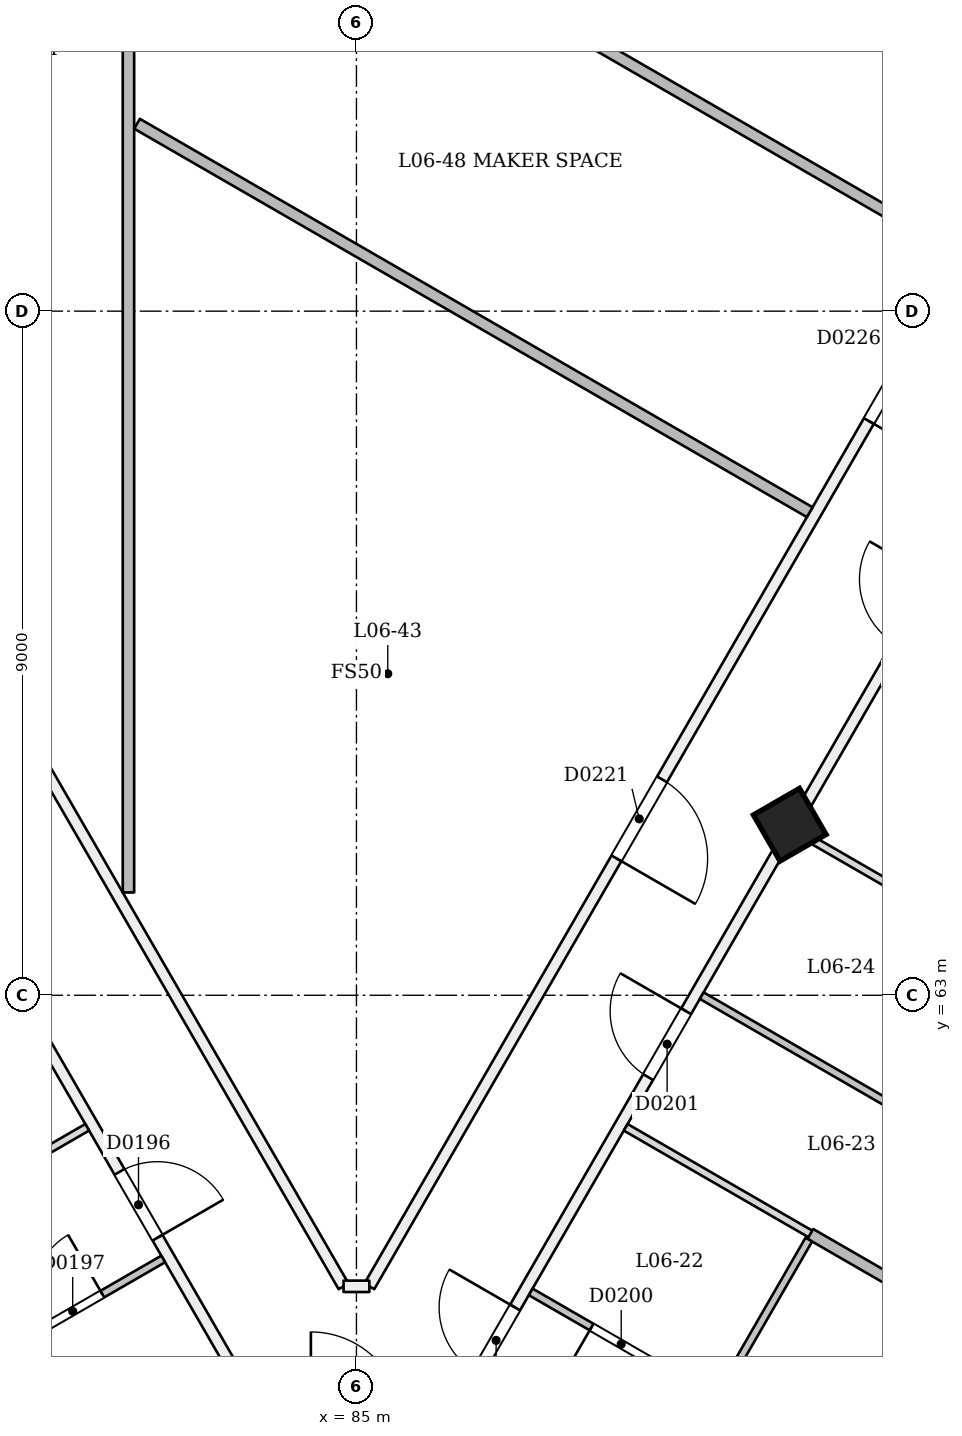
"""IFC4 building model, lengths in metres.
Left out: names, types, materials, properties, quantities, classifications, styles, units other than length and angle.
Written with IfcOpenShell. Run it as: python <this file> out.ifc"""

import sys

from ifc_helpers import new_model, si_unit, direction, frame, frame_2d, origin, origin_2d, place, context, subcontext, project, spatial, rectangle, extrude, element, fill, save


model = new_model("IFC4")
c1 = context("Model", 3, precision=1e-05, world=origin(), true_north=direction((0.0, 1.0)))
c2 = subcontext(c1, "Body", "Model", "MODEL_VIEW")
j1 = project(units=[si_unit("LENGTHUNIT", "METRE"), si_unit("PLANEANGLEUNIT", "RADIAN")], contexts=[c1])
p1 = place(None, origin())
s1 = spatial("IfcSite", under=j1, at=p1, CompositionType="ELEMENT")
p2 = place(p1, origin())
s2 = spatial("IfcBuilding", under=s1, at=p2, CompositionType="ELEMENT")
p3 = place(p2, frame((0.0, 0.0, 30.6)))
s3 = spatial("IfcBuildingStorey", under=s2, at=p3, CompositionType="ELEMENT", Elevation=30.6)
p4 = place(p3, frame((90.728, 65.196, -0.021), z_axis=(-0.022155133694, 0.038483534979, 0.999013597298), x_axis=(-0.501317567522, -0.864978463486, 0.022202571901)))
e1 = element("IfcColumn", 1, at=p4, inside=s3, PredefinedType="COLUMN", context=c2, shape_type="SweptSolid", body=[
    extrude(rectangle(XDim=0.7, YDim=0.7, at=origin_2d()), origin(), (0.0, 0.0, 1.0), 3.604),
])
p5 = place(p3, frame((61.273, 96.374, 0.0), z_axis=(0.0, 0.0, 1.0), x_axis=(0.5000018851, -0.866024315419, 0.0)))
e2 = element("IfcWall", 2, at=p5, inside=s3, PredefinedType="PARTITIONING", context=c2, shape_type="SweptSolid", body=[
    extrude(rectangle(XDim=45.0, YDim=0.15, at=frame_2d((22.5, 0.0))), origin(), (0.0, 0.0, 1.0), 2.7),
])
p6 = place(p5, frame((2.829, 0.0, 0.0)))
e3 = element("IfcOpeningElement", 3, at=p6, cuts=e2, PredefinedType="OPENING", context=c2, shape_type="SweptSolid", body=[
    extrude(rectangle(XDim=1.1, YDim=2.1, at=frame_2d((0.55, 1.05))), frame((0.0, 0.085, 0.0), z_axis=(0.0, -1.0, 0.0), x_axis=(1.0, 0.0, 0.0)), (0.0, 0.0, 1.0), 0.171),
])
p7 = place(p5, frame((7.3, 0.0, 0.0)))
e4 = element("IfcOpeningElement", 4, at=p7, cuts=e2, PredefinedType="OPENING", context=c2, shape_type="SweptSolid", body=[
    extrude(rectangle(XDim=1.2, YDim=2.1, at=frame_2d((0.6, 1.05))), frame((0.0, 0.085, 0.0), z_axis=(0.0, -1.0, 0.0), x_axis=(1.0, 0.0, 0.0)), (0.0, 0.0, 1.0), 0.171),
])
p8 = place(p5, frame((14.22, 0.0, 0.0)))
e5 = element("IfcOpeningElement", 5, at=p8, cuts=e2, PredefinedType="OPENING", context=c2, shape_type="SweptSolid", body=[
    extrude(rectangle(XDim=1.0, YDim=2.1, at=frame_2d((0.5, 1.05))), frame((0.0, 0.085, 0.0), z_axis=(0.0, -1.0, 0.0), x_axis=(1.0, 0.0, 0.0)), (0.0, 0.0, 1.0), 0.171),
])
p9 = place(p5, frame((20.895, 0.0, 0.0)))
e6 = element("IfcOpeningElement", 6, at=p9, cuts=e2, PredefinedType="OPENING", context=c2, shape_type="SweptSolid", body=[
    extrude(rectangle(XDim=1.0, YDim=2.1, at=frame_2d((0.5, 1.05))), frame((0.0, 0.085, 0.0), z_axis=(0.0, -1.0, 0.0), x_axis=(1.0, 0.0, 0.0)), (0.0, 0.0, 1.0), 0.171),
])
p10 = place(p5, frame((24.25, 0.0, 0.0)))
e7 = element("IfcOpeningElement", 7, at=p10, cuts=e2, PredefinedType="OPENING", context=c2, shape_type="SweptSolid", body=[
    extrude(rectangle(XDim=1.0, YDim=2.1, at=frame_2d((0.5, 1.05))), frame((0.0, 0.085, 0.0), z_axis=(0.0, -1.0, 0.0), x_axis=(1.0, 0.0, 0.0)), (0.0, 0.0, 1.0), 0.171),
])
p11 = place(p5, frame((29.78, 0.0, 0.0)))
e8 = element("IfcOpeningElement", 8, at=p11, cuts=e2, PredefinedType="OPENING", context=c2, shape_type="SweptSolid", body=[
    extrude(rectangle(XDim=1.0, YDim=2.1, at=frame_2d((0.5, 1.05))), frame((0.0, 0.085, 0.0), z_axis=(0.0, -1.0, 0.0), x_axis=(1.0, 0.0, 0.0)), (0.0, 0.0, 1.0), 0.171),
])
p12 = place(p5, frame((34.3, 0.0, 0.0)))
e9 = element("IfcOpeningElement", 9, at=p12, cuts=e2, PredefinedType="OPENING", context=c2, shape_type="SweptSolid", body=[
    extrude(rectangle(XDim=1.2, YDim=2.1, at=frame_2d((0.6, 1.05))), frame((0.0, 0.085, 0.0), z_axis=(0.0, -1.0, 0.0), x_axis=(1.0, 0.0, 0.0)), (0.0, 0.0, 1.0), 0.171),
])
p13 = place(p5, frame((41.22, 0.0, 0.0)))
e10 = element("IfcOpeningElement", 10, at=p13, cuts=e2, PredefinedType="OPENING", context=c2, shape_type="SweptSolid", body=[
    extrude(rectangle(XDim=1.0, YDim=2.1, at=frame_2d((0.5, 1.05))), frame((0.0, 0.085, 0.0), z_axis=(0.0, -1.0, 0.0), x_axis=(1.0, 0.0, 0.0)), (0.0, 0.0, 1.0), 0.171),
])
p14 = place(p3, frame((86.227, 57.403, 0.0), z_axis=(0.0, 0.0, 1.0), x_axis=(0.5000018851, 0.866024315419, 0.0)))
e11 = element("IfcWall", 11, at=p14, inside=s3, PredefinedType="PARTITIONING", context=c2, shape_type="SweptSolid", body=[
    extrude(rectangle(XDim=45.0, YDim=0.15, at=frame_2d((22.5, 0.0))), origin(), (0.0, 0.0, 1.0), 2.7),
])
p15 = place(p14, frame((0.72, 0.0, 0.0)))
e12 = element("IfcOpeningElement", 12, at=p15, cuts=e11, PredefinedType="OPENING", context=c2, shape_type="SweptSolid", body=[
    extrude(rectangle(XDim=1.0, YDim=2.1, at=frame_2d((0.5, 1.05))), frame((0.0, 0.085, 0.0), z_axis=(0.0, -1.0, 0.0), x_axis=(1.0, 0.0, 0.0)), (0.0, 0.0, 1.0), 0.171),
])
p16 = place(p14, frame((5.22, 0.0, 0.0)))
e13 = element("IfcOpeningElement", 13, at=p16, cuts=e11, PredefinedType="OPENING", context=c2, shape_type="SweptSolid", body=[
    extrude(rectangle(XDim=1.0, YDim=2.1, at=frame_2d((0.5, 1.05))), frame((0.0, 0.085, 0.0), z_axis=(0.0, -1.0, 0.0), x_axis=(1.0, 0.0, 0.0)), (0.0, 0.0, 1.0), 0.171),
])
p17 = place(p14, frame((11.78, 0.0, 0.0)))
e14 = element("IfcOpeningElement", 14, at=p17, cuts=e11, PredefinedType="OPENING", context=c2, shape_type="SweptSolid", body=[
    extrude(rectangle(XDim=1.0, YDim=2.1, at=frame_2d((0.5, 1.05))), frame((0.0, 0.085, 0.0), z_axis=(0.0, -1.0, 0.0), x_axis=(1.0, 0.0, 0.0)), (0.0, 0.0, 1.0), 0.171),
])
p18 = place(p14, frame((14.22, 0.0, 0.0)))
e15 = element("IfcOpeningElement", 15, at=p18, cuts=e11, PredefinedType="OPENING", context=c2, shape_type="SweptSolid", body=[
    extrude(rectangle(XDim=1.0, YDim=2.1, at=frame_2d((0.5, 1.05))), frame((0.0, 0.085, 0.0), z_axis=(0.0, -1.0, 0.0), x_axis=(1.0, 0.0, 0.0)), (0.0, 0.0, 1.0), 0.171),
])
p19 = place(p14, frame((19.75, 0.0, 0.0)))
e16 = element("IfcOpeningElement", 16, at=p19, cuts=e11, PredefinedType="OPENING", context=c2, shape_type="SweptSolid", body=[
    extrude(rectangle(XDim=1.0, YDim=2.1, at=frame_2d((0.5, 1.05))), frame((0.0, 0.085, 0.0), z_axis=(0.0, -1.0, 0.0), x_axis=(1.0, 0.0, 0.0)), (0.0, 0.0, 1.0), 0.171),
])
p20 = place(p14, frame((23.105, 0.0, 0.0)))
e17 = element("IfcOpeningElement", 17, at=p20, cuts=e11, PredefinedType="OPENING", context=c2, shape_type="SweptSolid", body=[
    extrude(rectangle(XDim=1.0, YDim=2.1, at=frame_2d((0.5, 1.05))), frame((0.0, 0.085, 0.0), z_axis=(0.0, -1.0, 0.0), x_axis=(1.0, 0.0, 0.0)), (0.0, 0.0, 1.0), 0.171),
])
p21 = place(p14, frame((28.75, 0.0, 0.0)))
e18 = element("IfcOpeningElement", 18, at=p21, cuts=e11, PredefinedType="OPENING", context=c2, shape_type="SweptSolid", body=[
    extrude(rectangle(XDim=1.0, YDim=2.1, at=frame_2d((0.5, 1.05))), frame((0.0, 0.085, 0.0), z_axis=(0.0, -1.0, 0.0), x_axis=(1.0, 0.0, 0.0)), (0.0, 0.0, 1.0), 0.171),
])
p22 = place(p14, frame((32.105, 0.0, 0.0)))
e19 = element("IfcOpeningElement", 19, at=p22, cuts=e11, PredefinedType="OPENING", context=c2, shape_type="SweptSolid", body=[
    extrude(rectangle(XDim=1.0, YDim=2.1, at=frame_2d((0.5, 1.05))), frame((0.0, 0.085, 0.0), z_axis=(0.0, -1.0, 0.0), x_axis=(1.0, 0.0, 0.0)), (0.0, 0.0, 1.0), 0.171),
])
p23 = place(p14, frame((36.504, 0.0, 0.0)))
e20 = element("IfcOpeningElement", 20, at=p23, cuts=e11, PredefinedType="OPENING", context=c2, shape_type="SweptSolid", body=[
    extrude(rectangle(XDim=1.0, YDim=2.1, at=frame_2d((0.5, 1.05))), frame((0.0, 0.085, 0.0), z_axis=(0.0, -1.0, 0.0), x_axis=(1.0, 0.0, 0.0)), (0.0, 0.0, 1.0), 0.171),
])
p24 = place(p14, frame((38.654, 0.0, 0.0)))
e21 = element("IfcOpeningElement", 21, at=p24, cuts=e11, PredefinedType="OPENING", context=c2, shape_type="SweptSolid", body=[
    extrude(rectangle(XDim=1.0, YDim=2.1, at=frame_2d((0.5, 1.05))), frame((0.0, 0.085, 0.0), z_axis=(0.0, -1.0, 0.0), x_axis=(1.0, 0.0, 0.0)), (0.0, 0.0, 1.0), 0.171),
])
p25 = place(p14, frame((41.071, 0.0, 0.0)))
e22 = element("IfcOpeningElement", 22, at=p25, cuts=e11, PredefinedType="OPENING", context=c2, shape_type="SweptSolid", body=[
    extrude(rectangle(XDim=1.1, YDim=2.1, at=frame_2d((0.55, 1.05))), frame((0.0, 0.085, 0.0), z_axis=(0.0, -1.0, 0.0), x_axis=(1.0, 0.0, 0.0)), (0.0, 0.0, 1.0), 0.171),
])
p26 = place(p3, frame((103.315, 90.6, 0.0), z_axis=(0.0, 0.0, 1.0), x_axis=(-0.499999056994, -0.866025948229, 0.0)))
e23 = element("IfcWall", 23, at=p26, inside=s3, PredefinedType="PARTITIONING", context=c2, shape_type="SweptSolid", body=[
    extrude(rectangle(XDim=36.292, YDim=0.15, at=frame_2d((18.146, 0.0))), origin(), (0.0, 0.0, 1.0), 3.1),
])
p27 = place(p26, frame((10.576, 0.0, 0.0)))
e24 = element("IfcOpeningElement", 24, at=p27, cuts=e23, PredefinedType="OPENING", context=c2, shape_type="SweptSolid", body=[
    extrude(rectangle(XDim=1.2, YDim=2.1, at=frame_2d((0.6, 1.05))), frame((0.0, 0.085, 0.0), z_axis=(0.0, -1.0, 0.0), x_axis=(1.0, 0.0, 0.0)), (0.0, 0.0, 1.0), 0.171),
])
p28 = place(p26, frame((28.59, 0.0, 0.0)))
e25 = element("IfcOpeningElement", 25, at=p28, cuts=e23, PredefinedType="OPENING", context=c2, shape_type="SweptSolid", body=[
    extrude(rectangle(XDim=1.2, YDim=2.1, at=frame_2d((0.6, 1.05))), frame((0.0, 0.085, 0.0), z_axis=(0.0, -1.0, 0.0), x_axis=(1.0, 0.0, 0.0)), (0.0, 0.0, 1.0), 0.171),
])
p29 = place(p26, frame((17.248, 0.0, 0.0)))
e26 = element("IfcOpeningElement", 26, at=p29, cuts=e23, PredefinedType="OPENING", context=c2, shape_type="SweptSolid", body=[
    extrude(rectangle(XDim=1.2, YDim=2.1, at=frame_2d((0.6, 1.05))), frame((0.0, 0.085, 0.0), z_axis=(0.0, -1.0, 0.0), x_axis=(1.0, 0.0, 0.0)), (0.0, 0.0, 1.0), 0.171),
])
p30 = place(p26, frame((4.5, 0.0, 0.0)))
e27 = element("IfcOpeningElement", 27, at=p30, cuts=e23, PredefinedType="OPENING", context=c2, shape_type="SweptSolid", body=[
    extrude(rectangle(XDim=1.2, YDim=2.1, at=frame_2d((0.6, 1.05))), frame((0.0, 0.085, 0.0), z_axis=(0.0, -1.0, 0.0), x_axis=(1.0, 0.0, 0.0)), (0.0, 0.0, 1.0), 0.171),
])
p31 = place(p26, frame((21.947, 0.0, 0.0)))
e28 = element("IfcOpeningElement", 28, at=p31, cuts=e23, PredefinedType="OPENING", context=c2, shape_type="SweptSolid", body=[
    extrude(rectangle(XDim=1.2, YDim=2.1, at=frame_2d((0.6, 1.05))), frame((0.0, 0.085, 0.0), z_axis=(0.0, -1.0, 0.0), x_axis=(1.0, 0.0, 0.0)), (0.0, 0.0, 1.0), 0.171),
])
p32 = place(p3, frame((84.831, 59.171, 0.0), z_axis=(0.0, 0.0, 1.0), x_axis=(-0.499999056994, 0.866025948229, 0.0)))
e29 = element("IfcWall", 29, at=p32, inside=s3, PredefinedType="PARTITIONING", context=c2, shape_type="SweptSolid", body=[
    extrude(rectangle(XDim=36.292, YDim=0.15, at=frame_2d((18.146, 0.0))), origin(), (0.0, 0.0, 1.0), 3.1),
])
p33 = place(p32, frame((16.276, 0.0, 0.0)))
e30 = element("IfcOpeningElement", 30, at=p33, cuts=e29, PredefinedType="OPENING", context=c2, shape_type="SweptSolid", body=[
    extrude(rectangle(XDim=1.2, YDim=2.1, at=frame_2d((0.6, 1.05))), frame((0.0, 0.085, 0.0), z_axis=(0.0, -1.0, 0.0), x_axis=(1.0, 0.0, 0.0)), (0.0, 0.0, 1.0), 0.171),
])
p34 = place(p32, frame((27.931, 0.0, 0.0)))
e31 = element("IfcOpeningElement", 31, at=p34, cuts=e29, PredefinedType="OPENING", context=c2, shape_type="SweptSolid", body=[
    extrude(rectangle(XDim=1.2, YDim=2.1, at=frame_2d((0.6, 1.05))), frame((0.0, 0.085, 0.0), z_axis=(0.0, -1.0, 0.0), x_axis=(1.0, 0.0, 0.0)), (0.0, 0.0, 1.0), 0.171),
])
p35 = place(p3, frame((85.169, 59.171, 0.0), z_axis=(0.0, 0.0, 1.0), x_axis=(-1.0, 0.0, 0.0)))
e32 = element("IfcWall", 32, at=p35, inside=s3, PredefinedType="PARTITIONING", context=c2, shape_type="SweptSolid", body=[
    extrude(rectangle(XDim=0.339, YDim=0.15, at=frame_2d((0.169, 0.0))), origin(), (0.0, 0.0, 1.0), 3.1),
])
p36 = place(p3, frame((75.963, 58.09, 0.0), z_axis=(0.0, 0.0, 1.0), x_axis=(0.866025401434, 0.500000004071, 0.0)))
e33 = element("IfcWall", 33, at=p36, inside=s3, PredefinedType="PARTITIONING", context=c2, shape_type="SweptSolid", body=[
    extrude(rectangle(XDim=6.345, YDim=0.1, at=frame_2d((3.173, 0.0))), origin(), (0.0, 0.0, 1.0), 2.6),
])
p37 = place(p3, frame((80.011, 58.118, 0.0), z_axis=(0.0, 0.0, 1.0), x_axis=(0.866011447264, 0.500024172624, 0.0)))
e34 = element("IfcWall", 34, at=p37, inside=s3, PredefinedType="PARTITIONING", context=c2, shape_type="SweptSolid", body=[
    extrude(rectangle(XDim=2.825, YDim=0.1, at=frame_2d((1.413, 0.0))), origin(), (0.0, 0.0, 1.0), 3.1),
])
p38 = place(p37, frame((1.0, 0.0, 0.0)))
e35 = element("IfcOpeningElement", 35, at=p38, cuts=e34, PredefinedType="OPENING", context=c2, shape_type="SweptSolid", body=[
    extrude(rectangle(XDim=0.9, YDim=2.1, at=frame_2d((0.45, 1.05))), frame((0.0, 0.061, 0.0), z_axis=(0.0, -1.0, 0.0), x_axis=(1.0, 0.0, 0.0)), (0.0, 0.0, 1.0), 0.121),
])
p39 = place(p3, frame((90.951, 59.785, 0.0), z_axis=(0.0, 0.0, 1.0), x_axis=(-0.500047793048, -0.865997808697, 0.0)))
e36 = element("IfcWall", 36, at=p39, inside=s3, PredefinedType="PARTITIONING", context=c2, shape_type="SweptSolid", body=[
    extrude(rectangle(XDim=2.425, YDim=0.1, at=frame_2d((1.212, 0.0))), origin(), (0.0, 0.0, 1.0), 3.1),
])
p40 = place(p3, frame((89.739, 57.685, 0.0), z_axis=(0.0, 0.0, 1.0), x_axis=(-0.866048868473, 0.499959355765, 0.0)))
e37 = element("IfcWall", 37, at=p40, inside=s3, PredefinedType="PARTITIONING", context=c2, shape_type="SweptSolid", body=[
    extrude(rectangle(XDim=2.825, YDim=0.1, at=frame_2d((1.413, 0.0))), origin(), (0.0, 0.0, 1.0), 3.1),
])
p41 = place(p40, frame((1.0, 0.0, 0.0)))
e38 = element("IfcOpeningElement", 38, at=p41, cuts=e37, PredefinedType="OPENING", context=c2, shape_type="SweptSolid", body=[
    extrude(rectangle(XDim=0.9, YDim=2.1, at=frame_2d((0.45, 1.05))), frame((0.0, 0.061, 0.0), z_axis=(0.0, -1.0, 0.0), x_axis=(1.0, 0.0, 0.0)), (0.0, 0.0, 1.0), 0.121),
])
p42 = place(p3, frame((94.037, 58.09, 0.0), z_axis=(0.0, 0.0, 1.0), x_axis=(-0.866036293601, 0.499981137809, 0.0)))
e39 = element("IfcWall", 39, at=p42, inside=s3, PredefinedType="PARTITIONING", context=c2, shape_type="SweptSolid", body=[
    extrude(rectangle(XDim=3.54, YDim=0.15, at=frame_2d((1.77, 0.0))), origin(), (0.0, 0.0, 1.0), 2.6),
])
p43 = place(p3, frame((91.006, 59.84, 0.0), z_axis=(0.0, 0.0, 1.0), x_axis=(-0.866011243319, 0.500024525844, 0.0)))
e40 = element("IfcWall", 40, at=p43, inside=s3, PredefinedType="PARTITIONING", context=c2, shape_type="SweptSolid", body=[
    extrude(rectangle(XDim=2.845, YDim=0.1, at=frame_2d((1.422, 0.0))), origin(), (0.0, 0.0, 1.0), 3.1),
])
p44 = place(p3, frame((91.989, 61.582, 0.0), z_axis=(0.0, 0.0, 1.0), x_axis=(-0.866011447264, 0.500024172624, 0.0)))
e41 = element("IfcWall", 41, at=p44, inside=s3, PredefinedType="PARTITIONING", context=c2, shape_type="SweptSolid", body=[
    extrude(rectangle(XDim=2.825, YDim=0.1, at=frame_2d((1.413, 0.0))), origin(), (0.0, 0.0, 1.0), 3.1),
])
p45 = place(p3, frame((93.196, 63.772, 0.0), z_axis=(0.0, 0.0, 1.0), x_axis=(-0.866042014628, 0.499971228071, 0.0)))
e42 = element("IfcWall", 42, at=p45, inside=s3, PredefinedType="PARTITIONING", context=c2, shape_type="SweptSolid", body=[
    extrude(rectangle(XDim=2.775, YDim=0.1, at=frame_2d((1.388, 0.0))), origin(), (0.0, 0.0, 1.0), 2.7),
])
p46 = place(p3, frame((82.0, 64.352, 0.0), z_axis=(0.0, 0.0, 1.0), x_axis=(0.0, 1.0, 0.0)))
e43 = element("IfcWall", 43, at=p46, inside=s3, PredefinedType="PARTITIONING", context=c2, shape_type="SweptSolid", body=[
    extrude(rectangle(XDim=19.048, YDim=0.15, at=frame_2d((9.524, 0.0))), origin(), (0.0, 0.0, 1.0), 3.1),
])
p47 = place(p3, frame((90.963, 69.356, 0.0), z_axis=(0.0, 0.0, 1.0), x_axis=(-0.866024858179, 0.500000945016, 0.0)))
e44 = element("IfcWall", 44, at=p47, inside=s3, PredefinedType="PARTITIONING", context=c2, shape_type="SweptSolid", body=[
    extrude(rectangle(XDim=10.219, YDim=0.15, at=frame_2d((5.11, 0.0))), origin(), (0.0, 0.0, 1.0), 3.1),
])
p48 = place(p3, frame((82.113, 78.999, 0.0), z_axis=(0.0, 0.0, 1.0), x_axis=(0.866025387892, -0.500000027526, 0.0)))
e45 = element("IfcWall", 45, at=p48, inside=s3, PredefinedType="PARTITIONING", context=c2, shape_type="SweptSolid", body=[
    extrude(rectangle(XDim=12.486, YDim=0.15, at=frame_2d((6.243, 0.0))), origin(), (0.0, 0.0, 1.0), 3.1),
])
p49 = place(p13, origin())
e46 = element("IfcDoor", 46, at=p49, inside=s3, OperationType="SINGLE_SWING_RIGHT", PredefinedType="NOTDEFINED", context=c2, shape_type="SweptSolid", body=[
    extrude(rectangle(XDim=1.0, YDim=2.1, at=frame_2d((0.5, 1.05))), frame((0.0, 0.025, 0.0), z_axis=(0.0, -1.0, 0.0), x_axis=(1.0, 0.0, 0.0)), (0.0, 0.0, 1.0), 0.05),
])
fill(e10, e46)
p50 = place(p38, origin())
e47 = element("IfcDoor", 47, at=p50, inside=s3, OperationType="SINGLE_SWING_RIGHT", PredefinedType="NOTDEFINED", context=c2, shape_type="SweptSolid", body=[
    extrude(rectangle(XDim=0.9, YDim=2.1, at=frame_2d((0.45, 1.05))), frame((0.0, 0.025, 0.0), z_axis=(0.0, -1.0, 0.0), x_axis=(1.0, 0.0, 0.0)), (0.0, 0.0, 1.0), 0.05),
])
fill(e35, e47)
p51 = place(p15, origin())
e48 = element("IfcDoor", 48, at=p51, inside=s3, OperationType="SINGLE_SWING_RIGHT", PredefinedType="NOTDEFINED", context=c2, shape_type="SweptSolid", body=[
    extrude(rectangle(XDim=1.0, YDim=2.1, at=frame_2d((0.5, 1.05))), frame((0.0, 0.025, 0.0), z_axis=(0.0, -1.0, 0.0), x_axis=(1.0, 0.0, 0.0)), (0.0, 0.0, 1.0), 0.05),
])
fill(e12, e48)
p52 = place(p41, origin())
e49 = element("IfcDoor", 49, at=p52, inside=s3, OperationType="SINGLE_SWING_RIGHT", PredefinedType="NOTDEFINED", context=c2, shape_type="SweptSolid", body=[
    extrude(rectangle(XDim=0.9, YDim=2.1, at=frame_2d((0.45, 1.05))), frame((0.0, 0.025, 0.0), z_axis=(0.0, -1.0, 0.0), x_axis=(1.0, 0.0, 0.0)), (0.0, 0.0, 1.0), 0.05),
])
fill(e38, e49)
p53 = place(p16, origin())
e50 = element("IfcDoor", 50, at=p53, inside=s3, OperationType="SINGLE_SWING_RIGHT", PredefinedType="NOTDEFINED", context=c2, shape_type="SweptSolid", body=[
    extrude(rectangle(XDim=1.0, YDim=2.1, at=frame_2d((0.5, 1.05))), frame((0.0, 0.025, 0.0), z_axis=(0.0, -1.0, 0.0), x_axis=(1.0, 0.0, 0.0)), (0.0, 0.0, 1.0), 0.05),
])
fill(e13, e50)
p54 = place(p28, origin())
e51 = element("IfcDoor", 51, at=p54, inside=s3, OperationType="SINGLE_SWING_RIGHT", PredefinedType="NOTDEFINED", context=c2, shape_type="SweptSolid", body=[
    extrude(rectangle(XDim=1.2, YDim=2.1, at=frame_2d((0.6, 1.05))), frame((0.0, 0.025, 0.0), z_axis=(0.0, -1.0, 0.0), x_axis=(1.0, 0.0, 0.0)), (0.0, 0.0, 1.0), 0.05),
])
fill(e25, e51)
p55 = place(p31, origin())
e52 = element("IfcDoor", 52, at=p55, inside=s3, OperationType="SINGLE_SWING_RIGHT", PredefinedType="NOTDEFINED", context=c2, shape_type="SweptSolid", body=[
    extrude(rectangle(XDim=1.2, YDim=2.1, at=frame_2d((0.6, 1.05))), frame((0.0, 0.025, 0.0), z_axis=(0.0, -1.0, 0.0), x_axis=(1.0, 0.0, 0.0)), (0.0, 0.0, 1.0), 0.05),
])
fill(e28, e52)
save(model, sys.argv[1])
